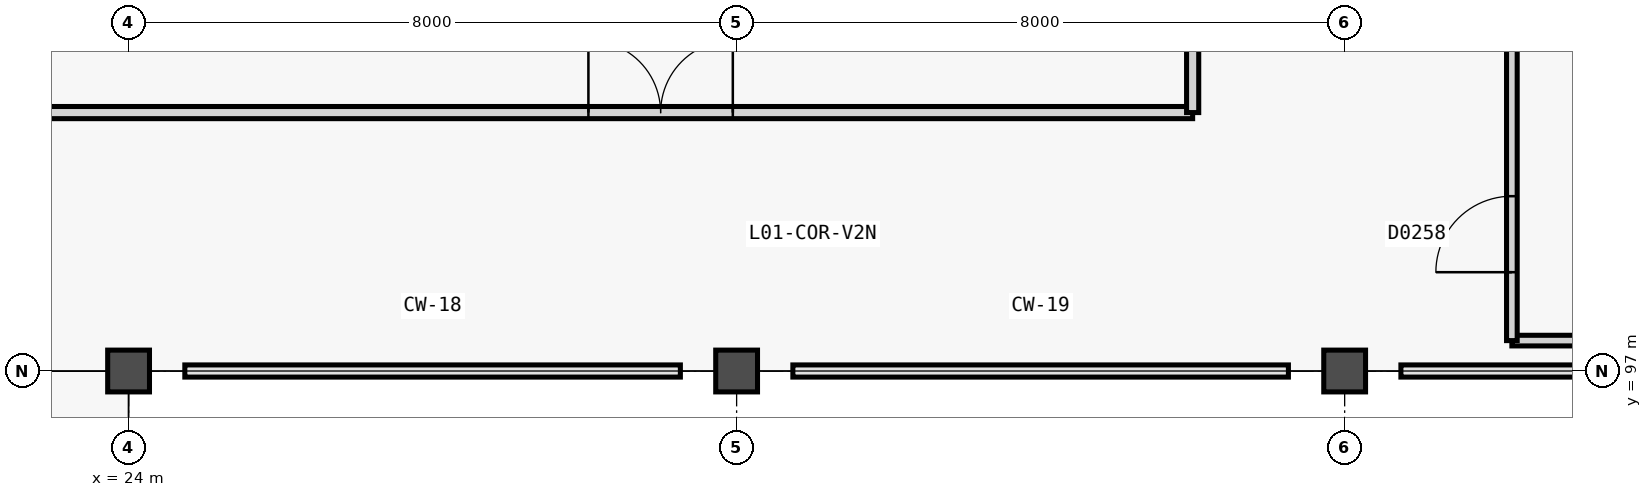
"""IFC4 building model, lengths in metres.
Left out: names, types, materials, properties, quantities, classifications, styles, units other than length and angle.
Written with IfcOpenShell. Run it as: python <this file> out.ifc"""

import sys

from ifc_helpers import new_model, si_unit, direction, frame, frame_2d, origin, origin_2d, place, context, subcontext, project, spatial, rectangle, extrude, element, fill, save


model = new_model("IFC4")
c1 = context("Model", 3, precision=1e-05, world=origin(), true_north=direction((0.0, 1.0)))
c2 = subcontext(c1, "Body", "Model", "MODEL_VIEW")
j1 = project(units=[si_unit("LENGTHUNIT", "METRE"), si_unit("PLANEANGLEUNIT", "RADIAN")], contexts=[c1])
p1 = place(None, origin())
s1 = spatial("IfcSite", under=j1, at=p1, CompositionType="ELEMENT")
p2 = place(p1, origin())
s2 = spatial("IfcBuilding", under=s1, at=p2, CompositionType="ELEMENT")
p3 = place(p2, frame((0.0, 0.0, 5.4)))
s3 = spatial("IfcBuildingStorey", under=s2, at=p3, CompositionType="ELEMENT", Elevation=5.4)
for number, where, z_axis, x_axis in (
    (1, (24.0, 97.0, 0.0), (0.0, 0.0, 1.0), (1.0, 0.0, 0.0)),
    (2, (32.0, 97.0, 0.0), (0.0, 0.0, 1.0), (1.0, 0.0, 0.0)),
    (3, (40.0, 97.0, 0.0), (0.0, 0.0, 1.0), (1.0, 0.0, 0.0)),
):
    element("IfcColumn", number, at=place(p3, frame(where, z_axis=z_axis, x_axis=x_axis)), inside=s3, PredefinedType="COLUMN", context=c2, shape_type="SweptSolid", body=[
        extrude(rectangle(XDim=0.55, YDim=0.55, at=origin_2d()), origin(), (0.0, 0.0, 1.0), 4.8),
    ])
p4 = place(p3, frame((0.6, 100.4, 0.0), z_axis=(0.0, 0.0, 1.0), x_axis=(1.0, 0.0, 0.0)))
e4 = element("IfcWall", 4, at=p4, inside=s3, PredefinedType="PARTITIONING", context=c2, shape_type="SweptSolid", body=[
    extrude(rectangle(XDim=37.4, YDim=0.16, at=frame_2d((18.7, 0.0))), origin(), (0.0, 0.0, 1.0), 4.54),
])
p5 = place(p4, frame((29.45, 0.0, 0.0)))
e5 = element("IfcOpeningElement", 5, at=p5, cuts=e4, PredefinedType="OPENING", context=c2, shape_type="SweptSolid", body=[
    extrude(rectangle(XDim=1.9, YDim=2.3, at=frame_2d((0.95, 1.15))), frame((0.0, 0.09, 0.0), z_axis=(0.0, -1.0, 0.0), x_axis=(1.0, 0.0, 0.0)), (0.0, 0.0, 1.0), 0.18),
])
p6 = place(p3, frame((38.0, 100.4, 0.0), z_axis=(0.0, 0.0, 1.0), x_axis=(0.0, 1.0, 0.0)))
e6 = element("IfcWall", 6, at=p6, inside=s3, PredefinedType="PARTITIONING", context=c2, shape_type="SweptSolid", body=[
    extrude(rectangle(XDim=9.8, YDim=0.16, at=frame_2d((4.9, 0.0))), origin(), (0.0, 0.0, 1.0), 4.54),
])
p7 = place(p3, frame((42.2, 97.4, 0.0), z_axis=(0.0, 0.0, 1.0), x_axis=(1.0, 0.0, 0.0)))
e7 = element("IfcWall", 7, at=p7, inside=s3, PredefinedType="PARTITIONING", context=c2, shape_type="SweptSolid", body=[
    extrude(rectangle(XDim=29.6, YDim=0.14, at=frame_2d((14.8, 0.0))), origin(), (0.0, 0.0, 1.0), 4.54),
])
p8 = place(p3, frame((42.2, 97.4, 0.0), z_axis=(0.0, 0.0, 1.0), x_axis=(0.0, 1.0, 0.0)))
e8 = element("IfcWall", 8, at=p8, inside=s3, PredefinedType="PARTITIONING", context=c2, shape_type="SweptSolid", body=[
    extrude(rectangle(XDim=12.8, YDim=0.14, at=frame_2d((6.4, 0.0))), origin(), (0.0, 0.0, 1.0), 4.54),
])
p9 = place(p8, frame((0.9, 0.0, 0.0)))
e9 = element("IfcOpeningElement", 9, at=p9, cuts=e8, PredefinedType="OPENING", context=c2, shape_type="SweptSolid", body=[
    extrude(rectangle(XDim=1.0, YDim=2.15, at=frame_2d((0.5, 1.075))), frame((0.0, 0.08, 0.0), z_axis=(0.0, -1.0, 0.0), x_axis=(1.0, 0.0, 0.0)), (0.0, 0.0, 1.0), 0.16),
])
p10 = place(p5, origin())
e10 = element("IfcDoor", 10, at=p10, inside=s3, OperationType="DOUBLE_DOOR_SINGLE_SWING", PredefinedType="DOOR", context=c2, shape_type="SweptSolid", body=[
    extrude(rectangle(XDim=1.9, YDim=2.3, at=frame_2d((0.95, 1.15))), frame((0.0, 0.025, 0.0), z_axis=(0.0, -1.0, 0.0), x_axis=(1.0, 0.0, 0.0)), (0.0, 0.0, 1.0), 0.05),
])
fill(e5, e10)
p11 = place(p9, origin())
e11 = element("IfcDoor", 11, at=p11, inside=s3, OperationType="SINGLE_SWING_LEFT", PredefinedType="DOOR", context=c2, shape_type="SweptSolid", body=[
    extrude(rectangle(XDim=1.0, YDim=2.15, at=frame_2d((0.5, 1.075))), frame((0.0, 0.025, 0.0), z_axis=(0.0, -1.0, 0.0), x_axis=(1.0, 0.0, 0.0)), (0.0, 0.0, 1.0), 0.05),
])
fill(e9, e11)
save(model, sys.argv[1])
